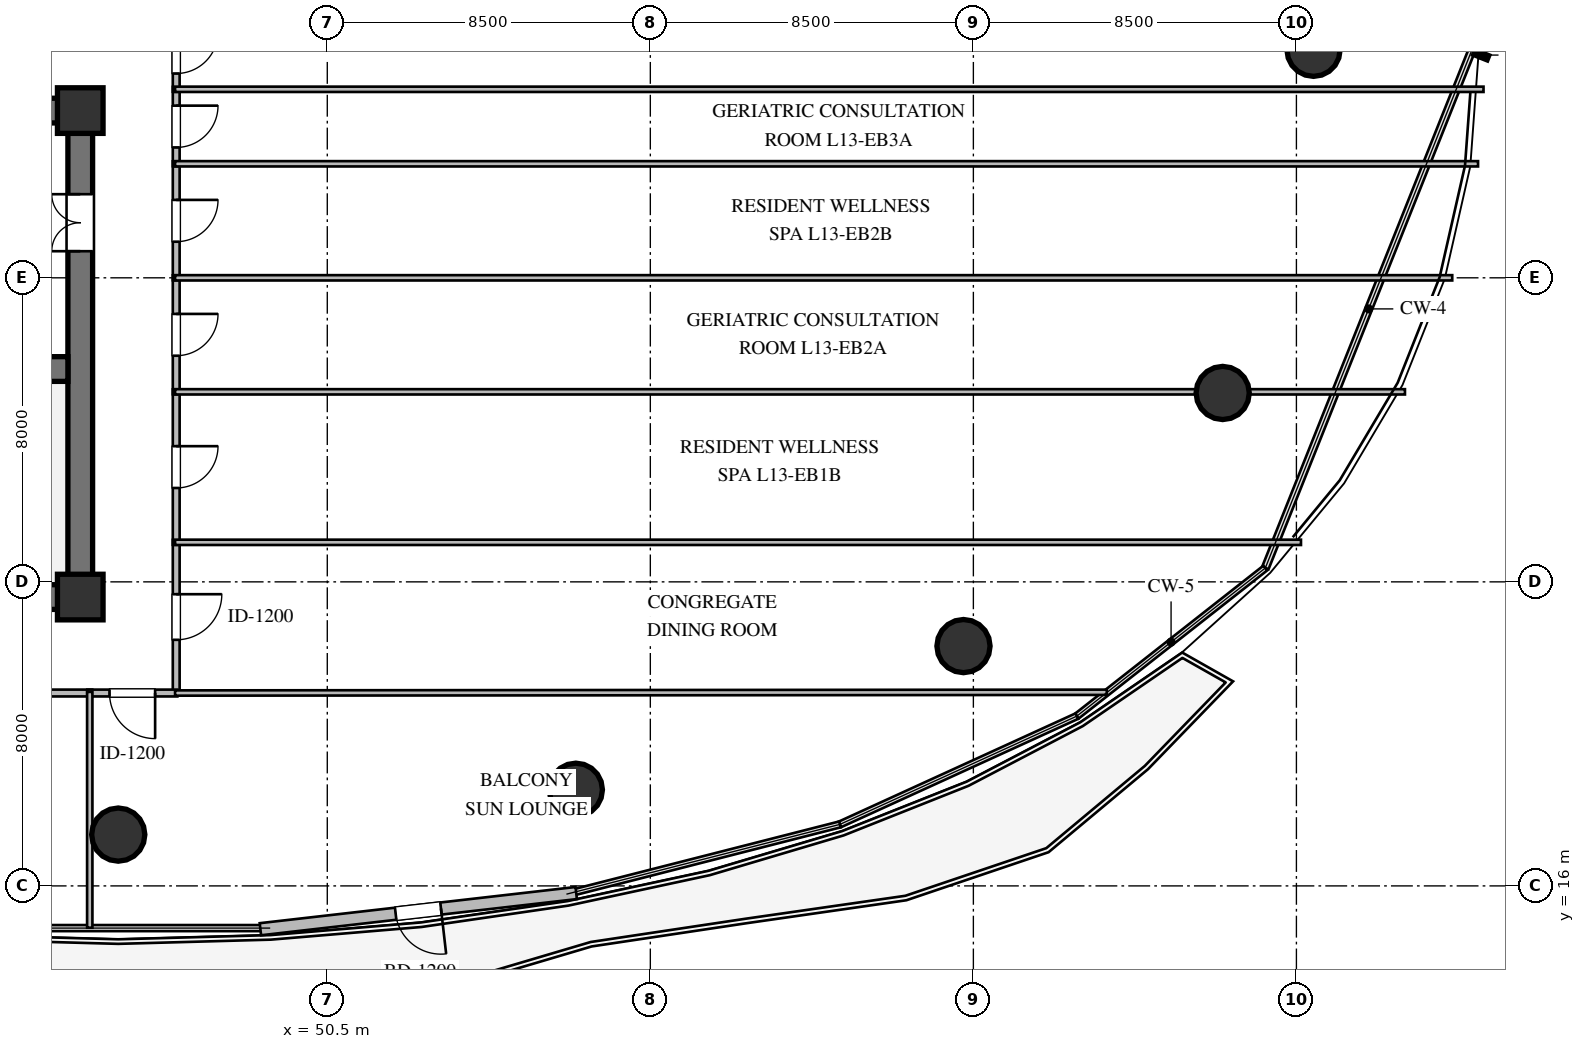
"""IFC4 building model, lengths in metres.
Left out: names, types, materials, properties, quantities, classifications, styles, units other than length and angle.
Written with IfcOpenShell. Run it as: python <this file> out.ifc"""

import sys

from ifc_helpers import new_model, si_unit, direction, frame, frame_2d, origin, origin_2d, place, context, subcontext, project, spatial, rectangle, circle, extrude, element, fill, save


model = new_model("IFC4")
c1 = context("Model", 3, precision=1e-05, world=origin(), true_north=direction((0.0, 1.0)))
c2 = subcontext(c1, "Body", "Model", "MODEL_VIEW")
j1 = project(units=[si_unit("LENGTHUNIT", "METRE"), si_unit("PLANEANGLEUNIT", "RADIAN")], contexts=[c1])
p1 = place(None, origin())
s1 = spatial("IfcSite", under=j1, at=p1, CompositionType="ELEMENT")
p2 = place(p1, origin())
s2 = spatial("IfcBuilding", under=s1, at=p2, CompositionType="ELEMENT")
p3 = place(p2, frame((0.0, 0.0, 52.8)))
s3 = spatial("IfcBuildingStorey", under=s2, at=p3, CompositionType="ELEMENT", Elevation=52.8)
for number, where, z_axis, x_axis in (
    (1, (21.675, 23.6, 0.0), (0.0, 0.0, 1.0), (1.0, 0.0, 0.0)),
    (2, (21.675, 36.4, 0.0), (0.0, 0.0, 1.0), (1.0, 0.0, 0.0)),
):
    element("IfcWall", number, at=place(p3, frame(where, z_axis=z_axis, x_axis=x_axis)), inside=s3, PredefinedType="SHEAR", context=c2, shape_type="SweptSolid", body=[
        extrude(rectangle(XDim=22.65, YDim=0.65, at=frame_2d((11.325, 0.0))), origin(), (0.0, 0.0, 1.0), 3.36),
    ])
p4 = place(p3, frame((44.0, 23.925, 0.0), z_axis=(0.0, 0.0, 1.0), x_axis=(0.0, 1.0, 0.0)))
e3 = element("IfcWall", 3, at=p4, inside=s3, PredefinedType="SHEAR", context=c2, shape_type="SweptSolid", body=[
    extrude(rectangle(XDim=12.15, YDim=0.65, at=frame_2d((6.075, 0.0))), origin(), (0.0, 0.0, 1.0), 3.36),
])
p5 = place(p4, frame((8.775, 0.0, 0.0)))
e4 = element("IfcOpeningElement", 4, at=p5, cuts=e3, PredefinedType="OPENING", context=c2, shape_type="SweptSolid", body=[
    extrude(rectangle(XDim=1.5, YDim=2.15, at=frame_2d((0.75, 1.075))), frame((0.0, 0.335, 0.0), z_axis=(0.0, -1.0, 0.0), x_axis=(1.0, 0.0, 0.0)), (0.0, 0.0, 1.0), 0.67),
])
p6 = place(p3, frame((22.325, 29.6, 0.0), z_axis=(0.0, 0.0, 1.0), x_axis=(1.0, 0.0, 0.0)))
e5 = element("IfcWall", 5, at=p6, inside=s3, PredefinedType="SHEAR", context=c2, shape_type="SweptSolid", body=[
    extrude(rectangle(XDim=21.35, YDim=0.65, at=frame_2d((10.675, 0.0))), origin(), (0.0, 0.0, 1.0), 3.36),
])
p7 = place(p6, frame((12.125, 0.0, 0.0)))
e6 = element("IfcOpeningElement", 6, at=p7, cuts=e5, PredefinedType="OPENING", context=c2, shape_type="SweptSolid", body=[
    extrude(rectangle(XDim=1.15, YDim=2.1, at=frame_2d((0.575, 1.05))), frame((0.0, 0.335, 0.0), z_axis=(0.0, -1.0, 0.0), x_axis=(1.0, 0.0, 0.0)), (0.0, 0.0, 1.0), 0.67),
])
for number, where, z_axis, x_axis in (
    (7, (44.0, 23.6, 0.0), (0.0, 0.0, 1.0), (1.0, 0.0, 0.0)),
    (8, (44.0, 36.4, 0.0), (0.0, 0.0, 1.0), (1.0, 0.0, 0.0)),
):
    element("IfcColumn", number, at=place(p3, frame(where, z_axis=z_axis, x_axis=x_axis)), inside=s3, PredefinedType="COLUMN", context=c2, shape_type="SweptSolid", body=[
        extrude(rectangle(XDim=1.2, YDim=1.2, at=origin_2d()), origin(), (0.0, 0.0, 1.0), 3.6),
    ])
for number, where, z_axis, x_axis in (
    (9, (76.45, 38.0, 0.0), (0.0, 0.0, 1.0), (1.0, 0.0, 0.0)),
    (10, (45.0, 17.35, 0.0), (0.0, 0.0, 1.0), (1.0, 0.0, 0.0)),
    (11, (57.04, 18.53, 0.0), (0.0, 0.0, 1.0), (1.0, 0.0, 0.0)),
    (12, (67.24, 22.31, 0.0), (0.0, 0.0, 1.0), (1.0, 0.0, 0.0)),
    (13, (74.06, 28.97, 0.0), (0.0, 0.0, 1.0), (1.0, 0.0, 0.0)),
):
    element("IfcColumn", number, at=place(p3, frame(where, z_axis=z_axis, x_axis=x_axis)), inside=s3, PredefinedType="COLUMN", context=c2, shape_type="SweptSolid", body=[
        extrude(circle(Radius=0.7, at=origin_2d()), origin(), (0.0, 0.0, 1.0), 3.6),
    ])
p8 = place(p3, frame((57.05, 15.812, 0.0), z_axis=(0.0, 0.0, 1.0), x_axis=(-0.993503192468, -0.113804246649, 0.0)))
e14 = element("IfcWall", 14, at=p8, inside=s3, PredefinedType="STANDARD", context=c2, shape_type="SweptSolid", body=[
    extrude(rectangle(XDim=8.365, YDim=0.32, at=frame_2d((4.182, 0.0))), origin(), (0.0, 0.0, 1.0), 3.36),
])
p9 = place(p8, frame((3.582, 0.0, 0.0)))
e15 = element("IfcOpeningElement", 15, at=p9, cuts=e14, PredefinedType="OPENING", context=c2, shape_type="SweptSolid", body=[
    extrude(rectangle(XDim=1.2, YDim=2.15, at=frame_2d((0.6, 1.075))), frame((0.0, 0.17, 0.0), z_axis=(0.0, -1.0, 0.0), x_axis=(1.0, 0.0, 0.0)), (0.0, 0.0, 1.0), 0.34),
])
p10 = place(p3, frame((46.525, 25.105, 0.0), z_axis=(0.0, 0.0, 1.0), x_axis=(0.0, -1.0, 0.0)))
e16 = element("IfcWall", 16, at=p10, inside=s3, PredefinedType="PARTITIONING", context=c2, shape_type="SweptSolid", body=[
    extrude(rectangle(XDim=4.06, YDim=0.18, at=frame_2d((2.03, 0.0))), origin(), (0.0, 0.0, 1.0), 3.36),
])
p11 = place(p10, frame((1.43, 0.0, 0.0)))
e17 = element("IfcOpeningElement", 17, at=p11, cuts=e16, PredefinedType="OPENING", context=c2, shape_type="SweptSolid", body=[
    extrude(rectangle(XDim=1.2, YDim=2.15, at=frame_2d((0.6, 1.075))), frame((0.0, 0.1, 0.0), z_axis=(0.0, -1.0, 0.0), x_axis=(1.0, 0.0, 0.0)), (0.0, 0.0, 1.0), 0.2),
])
p12 = place(p3, frame((46.525, 29.065, 0.0), z_axis=(0.0, 0.0, 1.0), x_axis=(0.0, -1.0, 0.0)))
e18 = element("IfcWall", 18, at=p12, inside=s3, PredefinedType="PARTITIONING", context=c2, shape_type="SweptSolid", body=[
    extrude(rectangle(XDim=4.09, YDim=0.18, at=frame_2d((2.045, 0.0))), origin(), (0.0, 0.0, 1.0), 3.36),
])
p13 = place(p12, frame((1.495, 0.0, 0.0)))
e19 = element("IfcOpeningElement", 19, at=p13, cuts=e18, PredefinedType="OPENING", context=c2, shape_type="SweptSolid", body=[
    extrude(rectangle(XDim=1.1, YDim=2.1, at=frame_2d((0.55, 1.05))), frame((0.0, 0.1, 0.0), z_axis=(0.0, -1.0, 0.0), x_axis=(1.0, 0.0, 0.0)), (0.0, 0.0, 1.0), 0.2),
])
p14 = place(p3, frame((46.525, 32.065, 0.0), z_axis=(0.0, 0.0, 1.0), x_axis=(0.0, -1.0, 0.0)))
e20 = element("IfcWall", 20, at=p14, inside=s3, PredefinedType="PARTITIONING", context=c2, shape_type="SweptSolid", body=[
    extrude(rectangle(XDim=3.13, YDim=0.18, at=frame_2d((1.565, 0.0))), origin(), (0.0, 0.0, 1.0), 3.36),
])
p15 = place(p14, frame((1.015, 0.0, 0.0)))
e21 = element("IfcOpeningElement", 21, at=p15, cuts=e20, PredefinedType="OPENING", context=c2, shape_type="SweptSolid", body=[
    extrude(rectangle(XDim=1.1, YDim=2.1, at=frame_2d((0.55, 1.05))), frame((0.0, 0.1, 0.0), z_axis=(0.0, -1.0, 0.0), x_axis=(1.0, 0.0, 0.0)), (0.0, 0.0, 1.0), 0.2),
])
p16 = place(p3, frame((46.525, 35.065, 0.0), z_axis=(0.0, 0.0, 1.0), x_axis=(0.0, -1.0, 0.0)))
e22 = element("IfcWall", 22, at=p16, inside=s3, PredefinedType="PARTITIONING", context=c2, shape_type="SweptSolid", body=[
    extrude(rectangle(XDim=3.13, YDim=0.18, at=frame_2d((1.565, 0.0))), origin(), (0.0, 0.0, 1.0), 3.36),
])
p17 = place(p16, frame((1.015, 0.0, 0.0)))
e23 = element("IfcOpeningElement", 23, at=p17, cuts=e22, PredefinedType="OPENING", context=c2, shape_type="SweptSolid", body=[
    extrude(rectangle(XDim=1.1, YDim=2.1, at=frame_2d((0.55, 1.05))), frame((0.0, 0.1, 0.0), z_axis=(0.0, -1.0, 0.0), x_axis=(1.0, 0.0, 0.0)), (0.0, 0.0, 1.0), 0.2),
])
p18 = place(p3, frame((46.525, 37.025, 0.0), z_axis=(0.0, 0.0, 1.0), x_axis=(0.0, -1.0, 0.0)))
e24 = element("IfcWall", 24, at=p18, inside=s3, PredefinedType="PARTITIONING", context=c2, shape_type="SweptSolid", body=[
    extrude(rectangle(XDim=2.09, YDim=0.18, at=frame_2d((1.045, 0.0))), origin(), (0.0, 0.0, 1.0), 3.36),
])
p19 = place(p18, frame((0.495, 0.0, 0.0)))
e25 = element("IfcOpeningElement", 25, at=p19, cuts=e24, PredefinedType="OPENING", context=c2, shape_type="SweptSolid", body=[
    extrude(rectangle(XDim=1.1, YDim=2.1, at=frame_2d((0.55, 1.05))), frame((0.0, 0.1, 0.0), z_axis=(0.0, -1.0, 0.0), x_axis=(1.0, 0.0, 0.0)), (0.0, 0.0, 1.0), 0.2),
])
p20 = place(p3, frame((46.525, 38.955, 0.0), z_axis=(0.0, 0.0, 1.0), x_axis=(0.0, -1.0, 0.0)))
e26 = element("IfcWall", 26, at=p20, inside=s3, PredefinedType="PARTITIONING", context=c2, shape_type="SweptSolid", body=[
    extrude(rectangle(XDim=2.06, YDim=0.18, at=frame_2d((1.03, 0.0))), origin(), (0.0, 0.0, 1.0), 3.36),
])
p21 = place(p20, frame((0.48, 0.0, 0.0)))
e27 = element("IfcOpeningElement", 27, at=p21, cuts=e26, PredefinedType="OPENING", context=c2, shape_type="SweptSolid", body=[
    extrude(rectangle(XDim=1.1, YDim=2.1, at=frame_2d((0.55, 1.05))), frame((0.0, 0.1, 0.0), z_axis=(0.0, -1.0, 0.0), x_axis=(1.0, 0.0, 0.0)), (0.0, 0.0, 1.0), 0.2),
])
p22 = place(p3, frame((44.315, 21.075, 0.0), z_axis=(0.0, 0.0, 1.0), x_axis=(-1.0, 0.0, 0.0)))
e28 = element("IfcWall", 28, at=p22, inside=s3, PredefinedType="PARTITIONING", context=c2, shape_type="SweptSolid", body=[
    extrude(rectangle(XDim=7.38, YDim=0.18, at=frame_2d((3.69, 0.0))), origin(), (0.0, 0.0, 1.0), 2.996),
])
p23 = place(p22, frame((3.14, 0.0, 0.0)))
e29 = element("IfcOpeningElement", 29, at=p23, cuts=e28, PredefinedType="OPENING", context=c2, shape_type="SweptSolid", body=[
    extrude(rectangle(XDim=1.1, YDim=2.1, at=frame_2d((0.55, 1.05))), frame((0.0, 0.1, 0.0), z_axis=(0.0, -1.0, 0.0), x_axis=(1.0, 0.0, 0.0)), (0.0, 0.0, 1.0), 0.2),
])
p24 = place(p3, frame((46.555, 21.075, 0.0), z_axis=(0.0, 0.0, 1.0), x_axis=(-1.0, 0.0, 0.0)))
e30 = element("IfcWall", 30, at=p24, inside=s3, PredefinedType="PARTITIONING", context=c2, shape_type="SweptSolid", body=[
    extrude(rectangle(XDim=2.37, YDim=0.18, at=frame_2d((1.185, 0.0))), origin(), (0.0, 0.0, 1.0), 3.36),
])
p25 = place(p24, frame((0.585, 0.0, 0.0)))
e31 = element("IfcOpeningElement", 31, at=p25, cuts=e30, PredefinedType="OPENING", context=c2, shape_type="SweptSolid", body=[
    extrude(rectangle(XDim=1.2, YDim=2.15, at=frame_2d((0.6, 1.075))), frame((0.0, 0.1, 0.0), z_axis=(0.0, -1.0, 0.0), x_axis=(1.0, 0.0, 0.0)), (0.0, 0.0, 1.0), 0.2),
])
p26 = place(p3, frame((46.495, 25.04, 0.0), z_axis=(0.0, 0.0, 1.0), x_axis=(1.0, 0.0, 0.0)))
e32 = element("IfcWall", 32, at=p26, inside=s3, PredefinedType="PARTITIONING", context=c2, shape_type="SweptSolid", body=[
    extrude(rectangle(XDim=29.625, YDim=0.14, at=frame_2d((14.812, 0.0))), origin(), (0.0, 0.0, 1.0), 2.89),
])
p27 = place(p3, frame((71.011, 21.094, 0.0), z_axis=(0.0, 0.0, 1.0), x_axis=(-0.999999682646, -0.000796685534, 0.0)))
e33 = element("IfcWall", 33, at=p27, inside=s3, PredefinedType="PARTITIONING", context=c2, shape_type="SweptSolid", body=[
    extrude(rectangle(XDim=24.516, YDim=0.14, at=frame_2d((12.258, 0.0))), origin(), (0.0, 0.0, 1.0), 2.996),
])
p28 = place(p3, frame((46.495, 29.0, 0.0), z_axis=(0.0, 0.0, 1.0), x_axis=(1.0, 0.0, 0.0)))
e34 = element("IfcWall", 34, at=p28, inside=s3, PredefinedType="PARTITIONING", context=c2, shape_type="SweptSolid", body=[
    extrude(rectangle(XDim=32.361, YDim=0.14, at=frame_2d((16.18, 0.0))), origin(), (0.0, 0.0, 1.0), 2.89),
])
p29 = place(p3, frame((46.495, 32.0, 0.0), z_axis=(0.0, 0.0, 1.0), x_axis=(1.0, 0.0, 0.0)))
e35 = element("IfcWall", 35, at=p29, inside=s3, PredefinedType="PARTITIONING", context=c2, shape_type="SweptSolid", body=[
    extrude(rectangle(XDim=33.605, YDim=0.14, at=frame_2d((16.802, 0.0))), origin(), (0.0, 0.0, 1.0), 3.36),
])
p30 = place(p3, frame((46.495, 35.0, 0.0), z_axis=(0.0, 0.0, 1.0), x_axis=(1.0, 0.0, 0.0)))
e36 = element("IfcWall", 36, at=p30, inside=s3, PredefinedType="PARTITIONING", context=c2, shape_type="SweptSolid", body=[
    extrude(rectangle(XDim=34.284, YDim=0.14, at=frame_2d((17.142, 0.0))), origin(), (0.0, 0.0, 1.0), 3.36),
])
p31 = place(p3, frame((46.495, 36.96, 0.0), z_axis=(0.0, 0.0, 1.0), x_axis=(1.0, 0.0, 0.0)))
e37 = element("IfcWall", 37, at=p31, inside=s3, PredefinedType="PARTITIONING", context=c2, shape_type="SweptSolid", body=[
    extrude(rectangle(XDim=34.428, YDim=0.14, at=frame_2d((17.214, 0.0))), origin(), (0.0, 0.0, 1.0), 2.89),
])
p32 = place(p3, frame((44.25, 21.105, 0.0), z_axis=(0.0, 0.0, 1.0), x_axis=(0.0, -1.0, 0.0)))
e38 = element("IfcWall", 38, at=p32, inside=s3, PredefinedType="PARTITIONING", context=c2, shape_type="SweptSolid", body=[
    extrude(rectangle(XDim=6.205, YDim=0.14, at=frame_2d((3.103, 0.0))), origin(), (0.0, 0.0, 1.0), 2.89),
])
p33 = place(p9, origin())
e39 = element("IfcDoor", 39, at=p33, inside=s3, OperationType="SINGLE_SWING_LEFT", PredefinedType="DOOR", context=c2, shape_type="SweptSolid", body=[
    extrude(rectangle(XDim=1.2, YDim=2.15, at=frame_2d((0.6, 1.075))), frame((0.0, 0.025, 0.0), z_axis=(0.0, -1.0, 0.0), x_axis=(1.0, 0.0, 0.0)), (0.0, 0.0, 1.0), 0.05),
])
fill(e15, e39)
p34 = place(p5, origin())
e40 = element("IfcDoor", 40, at=p34, inside=s3, OperationType="DOUBLE_DOOR_SINGLE_SWING", PredefinedType="DOOR", context=c2, shape_type="SweptSolid", body=[
    extrude(rectangle(XDim=1.5, YDim=2.15, at=frame_2d((0.75, 1.075))), frame((0.0, 0.025, 0.0), z_axis=(0.0, -1.0, 0.0), x_axis=(1.0, 0.0, 0.0)), (0.0, 0.0, 1.0), 0.05),
])
fill(e4, e40)
p35 = place(p11, origin())
e41 = element("IfcDoor", 41, at=p35, inside=s3, OperationType="SINGLE_SWING_LEFT", PredefinedType="DOOR", context=c2, shape_type="SweptSolid", body=[
    extrude(rectangle(XDim=1.2, YDim=2.15, at=frame_2d((0.6, 1.075))), frame((0.0, 0.025, 0.0), z_axis=(0.0, -1.0, 0.0), x_axis=(1.0, 0.0, 0.0)), (0.0, 0.0, 1.0), 0.05),
])
fill(e17, e41)
p36 = place(p13, origin())
e42 = element("IfcDoor", 42, at=p36, inside=s3, OperationType="SINGLE_SWING_LEFT", PredefinedType="DOOR", context=c2, shape_type="SweptSolid", body=[
    extrude(rectangle(XDim=1.1, YDim=2.1, at=frame_2d((0.55, 1.05))), frame((0.0, 0.025, 0.0), z_axis=(0.0, -1.0, 0.0), x_axis=(1.0, 0.0, 0.0)), (0.0, 0.0, 1.0), 0.05),
])
fill(e19, e42)
p37 = place(p15, origin())
e43 = element("IfcDoor", 43, at=p37, inside=s3, OperationType="SINGLE_SWING_LEFT", PredefinedType="DOOR", context=c2, shape_type="SweptSolid", body=[
    extrude(rectangle(XDim=1.1, YDim=2.1, at=frame_2d((0.55, 1.05))), frame((0.0, 0.025, 0.0), z_axis=(0.0, -1.0, 0.0), x_axis=(1.0, 0.0, 0.0)), (0.0, 0.0, 1.0), 0.05),
])
fill(e21, e43)
p38 = place(p17, origin())
e44 = element("IfcDoor", 44, at=p38, inside=s3, OperationType="SINGLE_SWING_LEFT", PredefinedType="DOOR", context=c2, shape_type="SweptSolid", body=[
    extrude(rectangle(XDim=1.1, YDim=2.1, at=frame_2d((0.55, 1.05))), frame((0.0, 0.025, 0.0), z_axis=(0.0, -1.0, 0.0), x_axis=(1.0, 0.0, 0.0)), (0.0, 0.0, 1.0), 0.05),
])
fill(e23, e44)
p39 = place(p19, origin())
e45 = element("IfcDoor", 45, at=p39, inside=s3, OperationType="SINGLE_SWING_LEFT", PredefinedType="DOOR", context=c2, shape_type="SweptSolid", body=[
    extrude(rectangle(XDim=1.1, YDim=2.1, at=frame_2d((0.55, 1.05))), frame((0.0, 0.025, 0.0), z_axis=(0.0, -1.0, 0.0), x_axis=(1.0, 0.0, 0.0)), (0.0, 0.0, 1.0), 0.05),
])
fill(e25, e45)
p40 = place(p21, origin())
e46 = element("IfcDoor", 46, at=p40, inside=s3, OperationType="SINGLE_SWING_LEFT", PredefinedType="DOOR", context=c2, shape_type="SweptSolid", body=[
    extrude(rectangle(XDim=1.1, YDim=2.1, at=frame_2d((0.55, 1.05))), frame((0.0, 0.025, 0.0), z_axis=(0.0, -1.0, 0.0), x_axis=(1.0, 0.0, 0.0)), (0.0, 0.0, 1.0), 0.05),
])
fill(e27, e46)
p41 = place(p25, origin())
e47 = element("IfcDoor", 47, at=p41, inside=s3, OperationType="SINGLE_SWING_LEFT", PredefinedType="DOOR", context=c2, shape_type="SweptSolid", body=[
    extrude(rectangle(XDim=1.2, YDim=2.15, at=frame_2d((0.6, 1.075))), frame((0.0, 0.025, 0.0), z_axis=(0.0, -1.0, 0.0), x_axis=(1.0, 0.0, 0.0)), (0.0, 0.0, 1.0), 0.05),
])
fill(e31, e47)
save(model, sys.argv[1])
